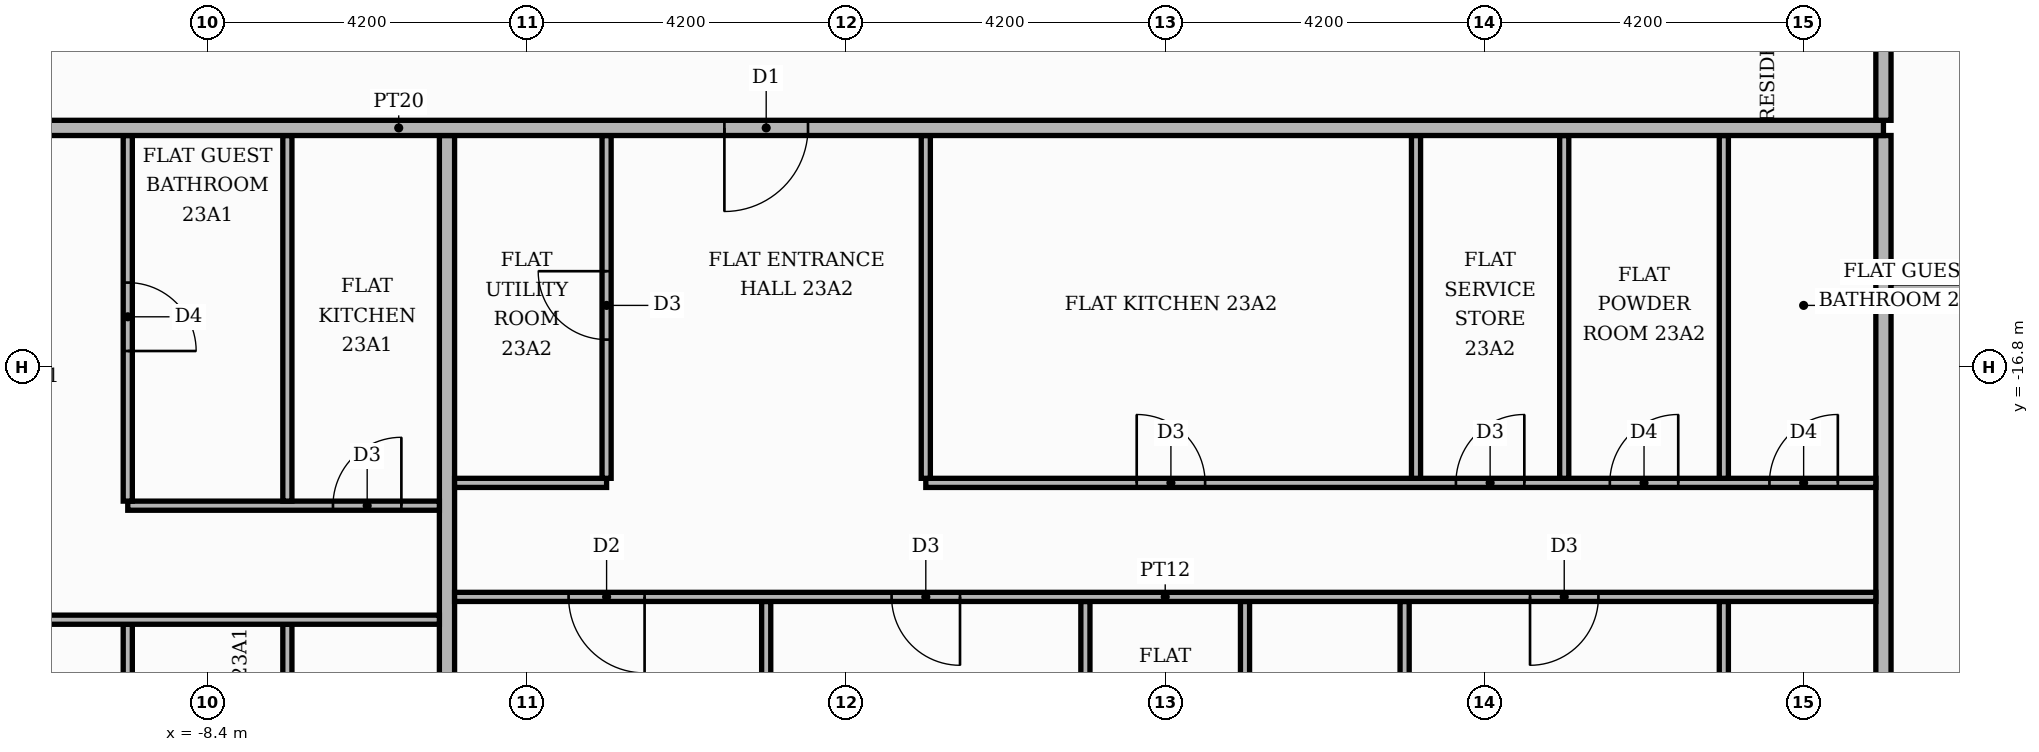
"""IFC4 building model, lengths in metres.
Left out: names, types, materials, properties, quantities, classifications, styles, units other than length and angle.
Written with IfcOpenShell. Run it as: python <this file> out.ifc"""

import sys

from ifc_helpers import new_model, si_unit, direction, frame, frame_2d, origin, place, context, subcontext, project, spatial, rectangle, extrude, element, fill, save


model = new_model("IFC4")
c1 = context("Model", 3, precision=1e-05, world=origin(), true_north=direction((0.0, 1.0)))
c2 = subcontext(c1, "Body", "Model", "MODEL_VIEW")
j1 = project(units=[si_unit("LENGTHUNIT", "METRE"), si_unit("PLANEANGLEUNIT", "RADIAN")], contexts=[c1])
p1 = place(None, origin())
s1 = spatial("IfcSite", under=j1, at=p1, CompositionType="ELEMENT")
p2 = place(p1, origin())
s2 = spatial("IfcBuilding", under=s1, at=p2, CompositionType="ELEMENT")
p3 = place(p2, frame((0.0, 0.0, 98.7)))
s3 = spatial("IfcBuildingStorey", under=s2, at=p3, CompositionType="ELEMENT", Elevation=98.7)
p4 = place(p3, frame((-9.45, -25.42, 0.0), z_axis=(0.0, 0.0, 1.0), x_axis=(0.0, 1.0, 0.0)))
e1 = element("IfcWall", 1, at=p4, inside=s3, PredefinedType="PARTITIONING", context=c2, shape_type="SweptSolid", body=[
    extrude(rectangle(XDim=5.24, YDim=0.12, at=frame_2d((2.62, 0.0))), origin(), (0.0, 0.0, 1.0), 3.48),
])
p5 = place(p4, frame((2.05, 0.0, 0.0)))
e2 = element("IfcOpeningElement", 2, at=p5, cuts=e1, PredefinedType="OPENING", context=c2, shape_type="SweptSolid", body=[
    extrude(rectangle(XDim=0.9, YDim=2.1, at=frame_2d((0.45, 1.05))), frame((0.0, 0.07, 0.0), z_axis=(0.0, -1.0, 0.0), x_axis=(1.0, 0.0, 0.0)), (0.0, 0.0, 1.0), 0.14),
])
p6 = place(p3, frame((-7.35, -25.42, 0.0), z_axis=(0.0, 0.0, 1.0), x_axis=(0.0, 1.0, 0.0)))
e3 = element("IfcWall", 3, at=p6, inside=s3, PredefinedType="PARTITIONING", context=c2, shape_type="SweptSolid", body=[
    extrude(rectangle(XDim=5.24, YDim=0.12, at=frame_2d((2.62, 0.0))), origin(), (0.0, 0.0, 1.0), 3.48),
])
p7 = place(p6, frame((2.05, 0.0, 0.0)))
e4 = element("IfcOpeningElement", 4, at=p7, cuts=e3, PredefinedType="OPENING", context=c2, shape_type="SweptSolid", body=[
    extrude(rectangle(XDim=0.9, YDim=2.1, at=frame_2d((0.45, 1.05))), frame((0.0, 0.07, 0.0), z_axis=(0.0, -1.0, 0.0), x_axis=(1.0, 0.0, 0.0)), (0.0, 0.0, 1.0), 0.14),
])
p8 = place(p3, frame((-5.25, -25.42, 0.0), z_axis=(0.0, 0.0, 1.0), x_axis=(0.0, 1.0, 0.0)))
e5 = element("IfcWall", 5, at=p8, inside=s3, PredefinedType="PARTITIONING", context=c2, shape_type="SweptSolid", body=[
    extrude(rectangle(XDim=11.67, YDim=0.2, at=frame_2d((5.835, 0.0))), origin(), (0.0, 0.0, 1.0), 3.48),
])
p9 = place(p3, frame((-1.05, -25.42, 0.0), z_axis=(0.0, 0.0, 1.0), x_axis=(0.0, 1.0, 0.0)))
e6 = element("IfcWall", 6, at=p9, inside=s3, PredefinedType="PARTITIONING", context=c2, shape_type="SweptSolid", body=[
    extrude(rectangle(XDim=5.54, YDim=0.12, at=frame_2d((2.77, 0.0))), origin(), (0.0, 0.0, 1.0), 3.48),
])
p10 = place(p3, frame((3.15, -25.42, 0.0), z_axis=(0.0, 0.0, 1.0), x_axis=(0.0, 1.0, 0.0)))
e7 = element("IfcWall", 7, at=p10, inside=s3, PredefinedType="PARTITIONING", context=c2, shape_type="SweptSolid", body=[
    extrude(rectangle(XDim=5.54, YDim=0.12, at=frame_2d((2.77, 0.0))), origin(), (0.0, 0.0, 1.0), 3.48),
])
p11 = place(p10, frame((2.2, 0.0, 0.0)))
e8 = element("IfcOpeningElement", 8, at=p11, cuts=e7, PredefinedType="OPENING", context=c2, shape_type="SweptSolid", body=[
    extrude(rectangle(XDim=0.9, YDim=2.1, at=frame_2d((0.45, 1.05))), frame((0.0, 0.07, 0.0), z_axis=(0.0, -1.0, 0.0), x_axis=(1.0, 0.0, 0.0)), (0.0, 0.0, 1.0), 0.14),
])
p12 = place(p3, frame((5.25, -25.42, 0.0), z_axis=(0.0, 0.0, 1.0), x_axis=(0.0, 1.0, 0.0)))
e9 = element("IfcWall", 9, at=p12, inside=s3, PredefinedType="PARTITIONING", context=c2, shape_type="SweptSolid", body=[
    extrude(rectangle(XDim=5.54, YDim=0.12, at=frame_2d((2.77, 0.0))), origin(), (0.0, 0.0, 1.0), 3.48),
])
p13 = place(p12, frame((2.2, 0.0, 0.0)))
e10 = element("IfcOpeningElement", 10, at=p13, cuts=e9, PredefinedType="OPENING", context=c2, shape_type="SweptSolid", body=[
    extrude(rectangle(XDim=0.9, YDim=2.1, at=frame_2d((0.45, 1.05))), frame((0.0, 0.07, 0.0), z_axis=(0.0, -1.0, 0.0), x_axis=(1.0, 0.0, 0.0)), (0.0, 0.0, 1.0), 0.14),
])
p14 = place(p3, frame((7.35, -25.42, 0.0), z_axis=(0.0, 0.0, 1.0), x_axis=(0.0, 1.0, 0.0)))
e11 = element("IfcWall", 11, at=p14, inside=s3, PredefinedType="PARTITIONING", context=c2, shape_type="SweptSolid", body=[
    extrude(rectangle(XDim=5.54, YDim=0.12, at=frame_2d((2.77, 0.0))), origin(), (0.0, 0.0, 1.0), 3.48),
])
p15 = place(p3, frame((11.55, -25.42, 0.0), z_axis=(0.0, 0.0, 1.0), x_axis=(0.0, 1.0, 0.0)))
e12 = element("IfcWall", 12, at=p15, inside=s3, PredefinedType="PARTITIONING", context=c2, shape_type="SweptSolid", body=[
    extrude(rectangle(XDim=5.54, YDim=0.12, at=frame_2d((2.77, 0.0))), origin(), (0.0, 0.0, 1.0), 3.48),
])
p16 = place(p15, frame((2.2, 0.0, 0.0)))
e13 = element("IfcOpeningElement", 13, at=p16, cuts=e12, PredefinedType="OPENING", context=c2, shape_type="SweptSolid", body=[
    extrude(rectangle(XDim=0.9, YDim=2.1, at=frame_2d((0.45, 1.05))), frame((0.0, 0.07, 0.0), z_axis=(0.0, -1.0, 0.0), x_axis=(1.0, 0.0, 0.0)), (0.0, 0.0, 1.0), 0.14),
])
p17 = place(p3, frame((13.65, -25.42, 0.0), z_axis=(0.0, 0.0, 1.0), x_axis=(0.0, 1.0, 0.0)))
e14 = element("IfcWall", 14, at=p17, inside=s3, PredefinedType="PARTITIONING", context=c2, shape_type="SweptSolid", body=[
    extrude(rectangle(XDim=11.67, YDim=0.2, at=frame_2d((5.835, 0.0))), origin(), (0.0, 0.0, 1.0), 3.48),
])
p18 = place(p3, frame((-17.4, -20.12, 0.0), z_axis=(0.0, 0.0, 1.0), x_axis=(1.0, 0.0, 0.0)))
e15 = element("IfcWall", 15, at=p18, inside=s3, PredefinedType="PARTITIONING", context=c2, shape_type="SweptSolid", body=[
    extrude(rectangle(XDim=12.05, YDim=0.12, at=frame_2d((6.025, 0.0))), origin(), (0.0, 0.0, 1.0), 3.48),
])
p19 = place(p18, frame((2.2, 0.0, 0.0)))
e16 = element("IfcOpeningElement", 16, at=p19, cuts=e15, PredefinedType="OPENING", context=c2, shape_type="SweptSolid", body=[
    extrude(rectangle(XDim=1.0, YDim=2.1, at=frame_2d((0.5, 1.05))), frame((0.0, 0.07, 0.0), z_axis=(0.0, -1.0, 0.0), x_axis=(1.0, 0.0, 0.0)), (0.0, 0.0, 1.0), 0.14),
])
p20 = place(p18, frame((5.4, 0.0, 0.0)))
e17 = element("IfcOpeningElement", 17, at=p20, cuts=e15, PredefinedType="OPENING", context=c2, shape_type="SweptSolid", body=[
    extrude(rectangle(XDim=0.9, YDim=2.1, at=frame_2d((0.45, 1.05))), frame((0.0, 0.07, 0.0), z_axis=(0.0, -1.0, 0.0), x_axis=(1.0, 0.0, 0.0)), (0.0, 0.0, 1.0), 0.14),
])
p21 = place(p3, frame((-5.15, -19.82, 0.0), z_axis=(0.0, 0.0, 1.0), x_axis=(1.0, 0.0, 0.0)))
e18 = element("IfcWall", 18, at=p21, inside=s3, PredefinedType="PARTITIONING", context=c2, shape_type="SweptSolid", body=[
    extrude(rectangle(XDim=18.7, YDim=0.12, at=frame_2d((9.35, 0.0))), origin(), (0.0, 0.0, 1.0), 3.48),
])
p22 = place(p21, frame((1.5, 0.0, 0.0)))
e19 = element("IfcOpeningElement", 19, at=p22, cuts=e18, PredefinedType="OPENING", context=c2, shape_type="SweptSolid", body=[
    extrude(rectangle(XDim=1.0, YDim=2.1, at=frame_2d((0.5, 1.05))), frame((0.0, 0.07, 0.0), z_axis=(0.0, -1.0, 0.0), x_axis=(1.0, 0.0, 0.0)), (0.0, 0.0, 1.0), 0.14),
])
p23 = place(p21, frame((5.75, 0.0, 0.0)))
e20 = element("IfcOpeningElement", 20, at=p23, cuts=e18, PredefinedType="OPENING", context=c2, shape_type="SweptSolid", body=[
    extrude(rectangle(XDim=0.9, YDim=2.1, at=frame_2d((0.45, 1.05))), frame((0.0, 0.07, 0.0), z_axis=(0.0, -1.0, 0.0), x_axis=(1.0, 0.0, 0.0)), (0.0, 0.0, 1.0), 0.14),
])
p24 = place(p21, frame((14.15, 0.0, 0.0)))
e21 = element("IfcOpeningElement", 21, at=p24, cuts=e18, PredefinedType="OPENING", context=c2, shape_type="SweptSolid", body=[
    extrude(rectangle(XDim=0.9, YDim=2.1, at=frame_2d((0.45, 1.05))), frame((0.0, 0.07, 0.0), z_axis=(0.0, -1.0, 0.0), x_axis=(1.0, 0.0, 0.0)), (0.0, 0.0, 1.0), 0.14),
])
p25 = place(p3, frame((-9.45, -18.62, 0.0), z_axis=(0.0, 0.0, 1.0), x_axis=(1.0, 0.0, 0.0)))
e22 = element("IfcWall", 22, at=p25, inside=s3, PredefinedType="PARTITIONING", context=c2, shape_type="SweptSolid", body=[
    extrude(rectangle(XDim=4.1, YDim=0.12, at=frame_2d((2.05, 0.0))), origin(), (0.0, 0.0, 1.0), 3.48),
])
p26 = place(p25, frame((2.7, 0.0, 0.0)))
e23 = element("IfcOpeningElement", 23, at=p26, cuts=e22, PredefinedType="OPENING", context=c2, shape_type="SweptSolid", body=[
    extrude(rectangle(XDim=0.9, YDim=2.1, at=frame_2d((0.45, 1.05))), frame((0.0, 0.07, 0.0), z_axis=(0.0, -1.0, 0.0), x_axis=(1.0, 0.0, 0.0)), (0.0, 0.0, 1.0), 0.14),
])
p27 = place(p3, frame((-9.45, -18.56, 0.0), z_axis=(0.0, 0.0, 1.0), x_axis=(0.0, 1.0, 0.0)))
e24 = element("IfcWall", 24, at=p27, inside=s3, PredefinedType="PARTITIONING", context=c2, shape_type="SweptSolid", body=[
    extrude(rectangle(XDim=4.81, YDim=0.12, at=frame_2d((2.405, 0.0))), origin(), (0.0, 0.0, 1.0), 3.48),
])
p28 = place(p27, frame((1.975, 0.0, 0.0)))
e25 = element("IfcOpeningElement", 25, at=p28, cuts=e24, PredefinedType="OPENING", context=c2, shape_type="SweptSolid", body=[
    extrude(rectangle(XDim=0.9, YDim=2.1, at=frame_2d((0.45, 1.05))), frame((0.0, 0.07, 0.0), z_axis=(0.0, -1.0, 0.0), x_axis=(1.0, 0.0, 0.0)), (0.0, 0.0, 1.0), 0.14),
])
p29 = place(p3, frame((-7.35, -18.56, 0.0), z_axis=(0.0, 0.0, 1.0), x_axis=(0.0, 1.0, 0.0)))
e26 = element("IfcWall", 26, at=p29, inside=s3, PredefinedType="PARTITIONING", context=c2, shape_type="SweptSolid", body=[
    extrude(rectangle(XDim=4.81, YDim=0.12, at=frame_2d((2.405, 0.0))), origin(), (0.0, 0.0, 1.0), 3.48),
])
p30 = place(p3, frame((-5.15, -18.32, 0.0), z_axis=(0.0, 0.0, 1.0), x_axis=(1.0, 0.0, 0.0)))
e27 = element("IfcWall", 27, at=p30, inside=s3, PredefinedType="PARTITIONING", context=c2, shape_type="SweptSolid", body=[
    extrude(rectangle(XDim=2.0, YDim=0.12, at=frame_2d((1.0, 0.0))), origin(), (0.0, 0.0, 1.0), 3.48),
])
p31 = place(p3, frame((1.05, -18.32, 0.0), z_axis=(0.0, 0.0, 1.0), x_axis=(1.0, 0.0, 0.0)))
e28 = element("IfcWall", 28, at=p31, inside=s3, PredefinedType="PARTITIONING", context=c2, shape_type="SweptSolid", body=[
    extrude(rectangle(XDim=12.5, YDim=0.12, at=frame_2d((6.25, 0.0))), origin(), (0.0, 0.0, 1.0), 3.48),
])
p32 = place(p31, frame((2.775, 0.0, 0.0)))
e29 = element("IfcOpeningElement", 29, at=p32, cuts=e28, PredefinedType="OPENING", context=c2, shape_type="SweptSolid", body=[
    extrude(rectangle(XDim=0.9, YDim=2.1, at=frame_2d((0.45, 1.05))), frame((0.0, 0.07, 0.0), z_axis=(0.0, -1.0, 0.0), x_axis=(1.0, 0.0, 0.0)), (0.0, 0.0, 1.0), 0.14),
])
p33 = place(p31, frame((6.975, 0.0, 0.0)))
e30 = element("IfcOpeningElement", 30, at=p33, cuts=e28, PredefinedType="OPENING", context=c2, shape_type="SweptSolid", body=[
    extrude(rectangle(XDim=0.9, YDim=2.1, at=frame_2d((0.45, 1.05))), frame((0.0, 0.07, 0.0), z_axis=(0.0, -1.0, 0.0), x_axis=(1.0, 0.0, 0.0)), (0.0, 0.0, 1.0), 0.14),
])
p34 = place(p31, frame((9.0, 0.0, 0.0)))
e31 = element("IfcOpeningElement", 31, at=p34, cuts=e28, PredefinedType="OPENING", context=c2, shape_type="SweptSolid", body=[
    extrude(rectangle(XDim=0.9, YDim=2.1, at=frame_2d((0.45, 1.05))), frame((0.0, 0.07, 0.0), z_axis=(0.0, -1.0, 0.0), x_axis=(1.0, 0.0, 0.0)), (0.0, 0.0, 1.0), 0.14),
])
p35 = place(p31, frame((11.1, 0.0, 0.0)))
e32 = element("IfcOpeningElement", 32, at=p35, cuts=e28, PredefinedType="OPENING", context=c2, shape_type="SweptSolid", body=[
    extrude(rectangle(XDim=0.9, YDim=2.1, at=frame_2d((0.45, 1.05))), frame((0.0, 0.07, 0.0), z_axis=(0.0, -1.0, 0.0), x_axis=(1.0, 0.0, 0.0)), (0.0, 0.0, 1.0), 0.14),
])
p36 = place(p3, frame((-3.15, -18.26, 0.0), z_axis=(0.0, 0.0, 1.0), x_axis=(0.0, 1.0, 0.0)))
e33 = element("IfcWall", 33, at=p36, inside=s3, PredefinedType="PARTITIONING", context=c2, shape_type="SweptSolid", body=[
    extrude(rectangle(XDim=4.51, YDim=0.12, at=frame_2d((2.255, 0.0))), origin(), (0.0, 0.0, 1.0), 3.48),
])
p37 = place(p36, frame((1.825, 0.0, 0.0)))
e34 = element("IfcOpeningElement", 34, at=p37, cuts=e33, PredefinedType="OPENING", context=c2, shape_type="SweptSolid", body=[
    extrude(rectangle(XDim=0.9, YDim=2.1, at=frame_2d((0.45, 1.05))), frame((0.0, 0.07, 0.0), z_axis=(0.0, -1.0, 0.0), x_axis=(1.0, 0.0, 0.0)), (0.0, 0.0, 1.0), 0.14),
])
for number, where, z_axis, x_axis in (
    (35, (1.05, -18.26, 0.0), (0.0, 0.0, 1.0), (0.0, 1.0, 0.0)),
    (36, (7.5, -18.26, 0.0), (0.0, 0.0, 1.0), (0.0, 1.0, 0.0)),
    (37, (9.45, -18.26, 0.0), (0.0, 0.0, 1.0), (0.0, 1.0, 0.0)),
    (38, (11.55, -18.26, 0.0), (0.0, 0.0, 1.0), (0.0, 1.0, 0.0)),
):
    element("IfcWall", number, at=place(p3, frame(where, z_axis=z_axis, x_axis=x_axis)), inside=s3, PredefinedType="PARTITIONING", context=c2, shape_type="SweptSolid", body=[
        extrude(rectangle(XDim=4.51, YDim=0.12, at=frame_2d((2.255, 0.0))), origin(), (0.0, 0.0, 1.0), 3.48),
    ])
p38 = place(p3, frame((13.75, -15.75, 0.0), z_axis=(0.0, 0.0, 1.0), x_axis=(1.0, 0.0, 0.0)))
e39 = element("IfcWall", 39, at=p38, inside=s3, PredefinedType="PARTITIONING", context=c2, shape_type="SweptSolid", body=[
    extrude(rectangle(XDim=6.37, YDim=0.12, at=frame_2d((3.185, 0.0))), origin(), (0.0, 0.0, 1.0), 3.48),
])
p39 = place(p38, frame((2.635, 0.0, 0.0)))
e40 = element("IfcOpeningElement", 40, at=p39, cuts=e39, PredefinedType="OPENING", context=c2, shape_type="SweptSolid", body=[
    extrude(rectangle(XDim=1.0, YDim=2.1, at=frame_2d((0.5, 1.05))), frame((0.0, 0.07, 0.0), z_axis=(0.0, -1.0, 0.0), x_axis=(1.0, 0.0, 0.0)), (0.0, 0.0, 1.0), 0.14),
])
p40 = place(p3, frame((-25.42, -13.65, 0.0), z_axis=(0.0, 0.0, 1.0), x_axis=(1.0, 0.0, 0.0)))
e41 = element("IfcWall", 41, at=p40, inside=s3, PredefinedType="PARTITIONING", context=c2, shape_type="SweptSolid", body=[
    extrude(rectangle(XDim=39.07, YDim=0.2, at=frame_2d((19.535, 0.0))), origin(), (0.0, 0.0, 1.0), 3.48),
])
p41 = place(p40, frame((13.32, 0.0, 0.0)))
e42 = element("IfcOpeningElement", 42, at=p41, cuts=e41, PredefinedType="OPENING", context=c2, shape_type="SweptSolid", body=[
    extrude(rectangle(XDim=1.1, YDim=2.4, at=frame_2d((0.55, 1.2))), frame((0.0, 0.11, 0.0), z_axis=(0.0, -1.0, 0.0), x_axis=(1.0, 0.0, 0.0)), (0.0, 0.0, 1.0), 0.22),
])
p42 = place(p40, frame((23.82, 0.0, 0.0)))
e43 = element("IfcOpeningElement", 43, at=p42, cuts=e41, PredefinedType="OPENING", context=c2, shape_type="SweptSolid", body=[
    extrude(rectangle(XDim=1.1, YDim=2.4, at=frame_2d((0.55, 1.2))), frame((0.0, 0.11, 0.0), z_axis=(0.0, -1.0, 0.0), x_axis=(1.0, 0.0, 0.0)), (0.0, 0.0, 1.0), 0.22),
])
p43 = place(p3, frame((13.65, -13.55, 0.0), z_axis=(0.0, 0.0, 1.0), x_axis=(0.0, 1.0, 0.0)))
e44 = element("IfcWall", 44, at=p43, inside=s3, PredefinedType="PARTITIONING", context=c2, shape_type="SweptSolid", body=[
    extrude(rectangle(XDim=8.2, YDim=0.2, at=frame_2d((4.1, 0.0))), origin(), (0.0, 0.0, 1.0), 3.48),
])
p44 = place(p43, frame((1.45, 0.0, 0.0)))
e45 = element("IfcOpeningElement", 45, at=p44, cuts=e44, PredefinedType="OPENING", context=c2, shape_type="SweptSolid", body=[
    extrude(rectangle(XDim=1.1, YDim=2.4, at=frame_2d((0.55, 1.2))), frame((0.0, 0.11, 0.0), z_axis=(0.0, -1.0, 0.0), x_axis=(1.0, 0.0, 0.0)), (0.0, 0.0, 1.0), 0.22),
])
p45 = place(p28, frame((0.9, 0.0, 0.0), z_axis=(0.0, 0.0, 1.0), x_axis=(-1.0, 0.0, 0.0)))
e46 = element("IfcDoor", 46, at=p45, inside=s3, OperationType="SINGLE_SWING_LEFT", PredefinedType="DOOR", context=c2, shape_type="SweptSolid", body=[
    extrude(rectangle(XDim=0.9, YDim=2.1, at=frame_2d((0.45, 1.05))), frame((0.0, 0.025, 0.0), z_axis=(0.0, -1.0, 0.0), x_axis=(1.0, 0.0, 0.0)), (0.0, 0.0, 1.0), 0.05),
])
fill(e25, e46)
p46 = place(p26, origin())
e47 = element("IfcDoor", 47, at=p46, inside=s3, OperationType="SINGLE_SWING_RIGHT", PredefinedType="DOOR", context=c2, shape_type="SweptSolid", body=[
    extrude(rectangle(XDim=0.9, YDim=2.1, at=frame_2d((0.45, 1.05))), frame((0.0, 0.025, 0.0), z_axis=(0.0, -1.0, 0.0), x_axis=(1.0, 0.0, 0.0)), (0.0, 0.0, 1.0), 0.05),
])
fill(e23, e47)
p47 = place(p42, frame((1.1, 0.0, 0.0), z_axis=(0.0, 0.0, 1.0), x_axis=(-1.0, 0.0, 0.0)))
e48 = element("IfcDoor", 48, at=p47, inside=s3, OperationType="SINGLE_SWING_LEFT", PredefinedType="DOOR", context=c2, shape_type="SweptSolid", body=[
    extrude(rectangle(XDim=1.1, YDim=2.4, at=frame_2d((0.55, 1.2))), frame((0.0, 0.025, 0.0), z_axis=(0.0, -1.0, 0.0), x_axis=(1.0, 0.0, 0.0)), (0.0, 0.0, 1.0), 0.05),
])
fill(e43, e48)
p48 = place(p37, origin())
e49 = element("IfcDoor", 49, at=p48, inside=s3, OperationType="SINGLE_SWING_RIGHT", PredefinedType="DOOR", context=c2, shape_type="SweptSolid", body=[
    extrude(rectangle(XDim=0.9, YDim=2.1, at=frame_2d((0.45, 1.05))), frame((0.0, 0.025, 0.0), z_axis=(0.0, -1.0, 0.0), x_axis=(1.0, 0.0, 0.0)), (0.0, 0.0, 1.0), 0.05),
])
fill(e34, e49)
p49 = place(p32, origin())
e50 = element("IfcDoor", 50, at=p49, inside=s3, OperationType="SINGLE_SWING_LEFT", PredefinedType="DOOR", context=c2, shape_type="SweptSolid", body=[
    extrude(rectangle(XDim=0.9, YDim=2.1, at=frame_2d((0.45, 1.05))), frame((0.0, 0.025, 0.0), z_axis=(0.0, -1.0, 0.0), x_axis=(1.0, 0.0, 0.0)), (0.0, 0.0, 1.0), 0.05),
])
fill(e29, e50)
p50 = place(p33, origin())
e51 = element("IfcDoor", 51, at=p50, inside=s3, OperationType="SINGLE_SWING_RIGHT", PredefinedType="DOOR", context=c2, shape_type="SweptSolid", body=[
    extrude(rectangle(XDim=0.9, YDim=2.1, at=frame_2d((0.45, 1.05))), frame((0.0, 0.025, 0.0), z_axis=(0.0, -1.0, 0.0), x_axis=(1.0, 0.0, 0.0)), (0.0, 0.0, 1.0), 0.05),
])
fill(e30, e51)
p51 = place(p34, origin())
e52 = element("IfcDoor", 52, at=p51, inside=s3, OperationType="SINGLE_SWING_RIGHT", PredefinedType="DOOR", context=c2, shape_type="SweptSolid", body=[
    extrude(rectangle(XDim=0.9, YDim=2.1, at=frame_2d((0.45, 1.05))), frame((0.0, 0.025, 0.0), z_axis=(0.0, -1.0, 0.0), x_axis=(1.0, 0.0, 0.0)), (0.0, 0.0, 1.0), 0.05),
])
fill(e31, e52)
p52 = place(p35, origin())
e53 = element("IfcDoor", 53, at=p52, inside=s3, OperationType="SINGLE_SWING_RIGHT", PredefinedType="DOOR", context=c2, shape_type="SweptSolid", body=[
    extrude(rectangle(XDim=0.9, YDim=2.1, at=frame_2d((0.45, 1.05))), frame((0.0, 0.025, 0.0), z_axis=(0.0, -1.0, 0.0), x_axis=(1.0, 0.0, 0.0)), (0.0, 0.0, 1.0), 0.05),
])
fill(e32, e53)
p53 = place(p22, frame((1.0, 0.0, 0.0), z_axis=(0.0, 0.0, 1.0), x_axis=(-1.0, 0.0, 0.0)))
e54 = element("IfcDoor", 54, at=p53, inside=s3, OperationType="SINGLE_SWING_RIGHT", PredefinedType="DOOR", context=c2, shape_type="SweptSolid", body=[
    extrude(rectangle(XDim=1.0, YDim=2.1, at=frame_2d((0.5, 1.05))), frame((0.0, 0.025, 0.0), z_axis=(0.0, -1.0, 0.0), x_axis=(1.0, 0.0, 0.0)), (0.0, 0.0, 1.0), 0.05),
])
fill(e19, e54)
p54 = place(p23, frame((0.9, 0.0, 0.0), z_axis=(0.0, 0.0, 1.0), x_axis=(-1.0, 0.0, 0.0)))
e55 = element("IfcDoor", 55, at=p54, inside=s3, OperationType="SINGLE_SWING_RIGHT", PredefinedType="DOOR", context=c2, shape_type="SweptSolid", body=[
    extrude(rectangle(XDim=0.9, YDim=2.1, at=frame_2d((0.45, 1.05))), frame((0.0, 0.025, 0.0), z_axis=(0.0, -1.0, 0.0), x_axis=(1.0, 0.0, 0.0)), (0.0, 0.0, 1.0), 0.05),
])
fill(e20, e55)
p55 = place(p24, frame((0.9, 0.0, 0.0), z_axis=(0.0, 0.0, 1.0), x_axis=(-1.0, 0.0, 0.0)))
e56 = element("IfcDoor", 56, at=p55, inside=s3, OperationType="SINGLE_SWING_LEFT", PredefinedType="DOOR", context=c2, shape_type="SweptSolid", body=[
    extrude(rectangle(XDim=0.9, YDim=2.1, at=frame_2d((0.45, 1.05))), frame((0.0, 0.025, 0.0), z_axis=(0.0, -1.0, 0.0), x_axis=(1.0, 0.0, 0.0)), (0.0, 0.0, 1.0), 0.05),
])
fill(e21, e56)
save(model, sys.argv[1])
